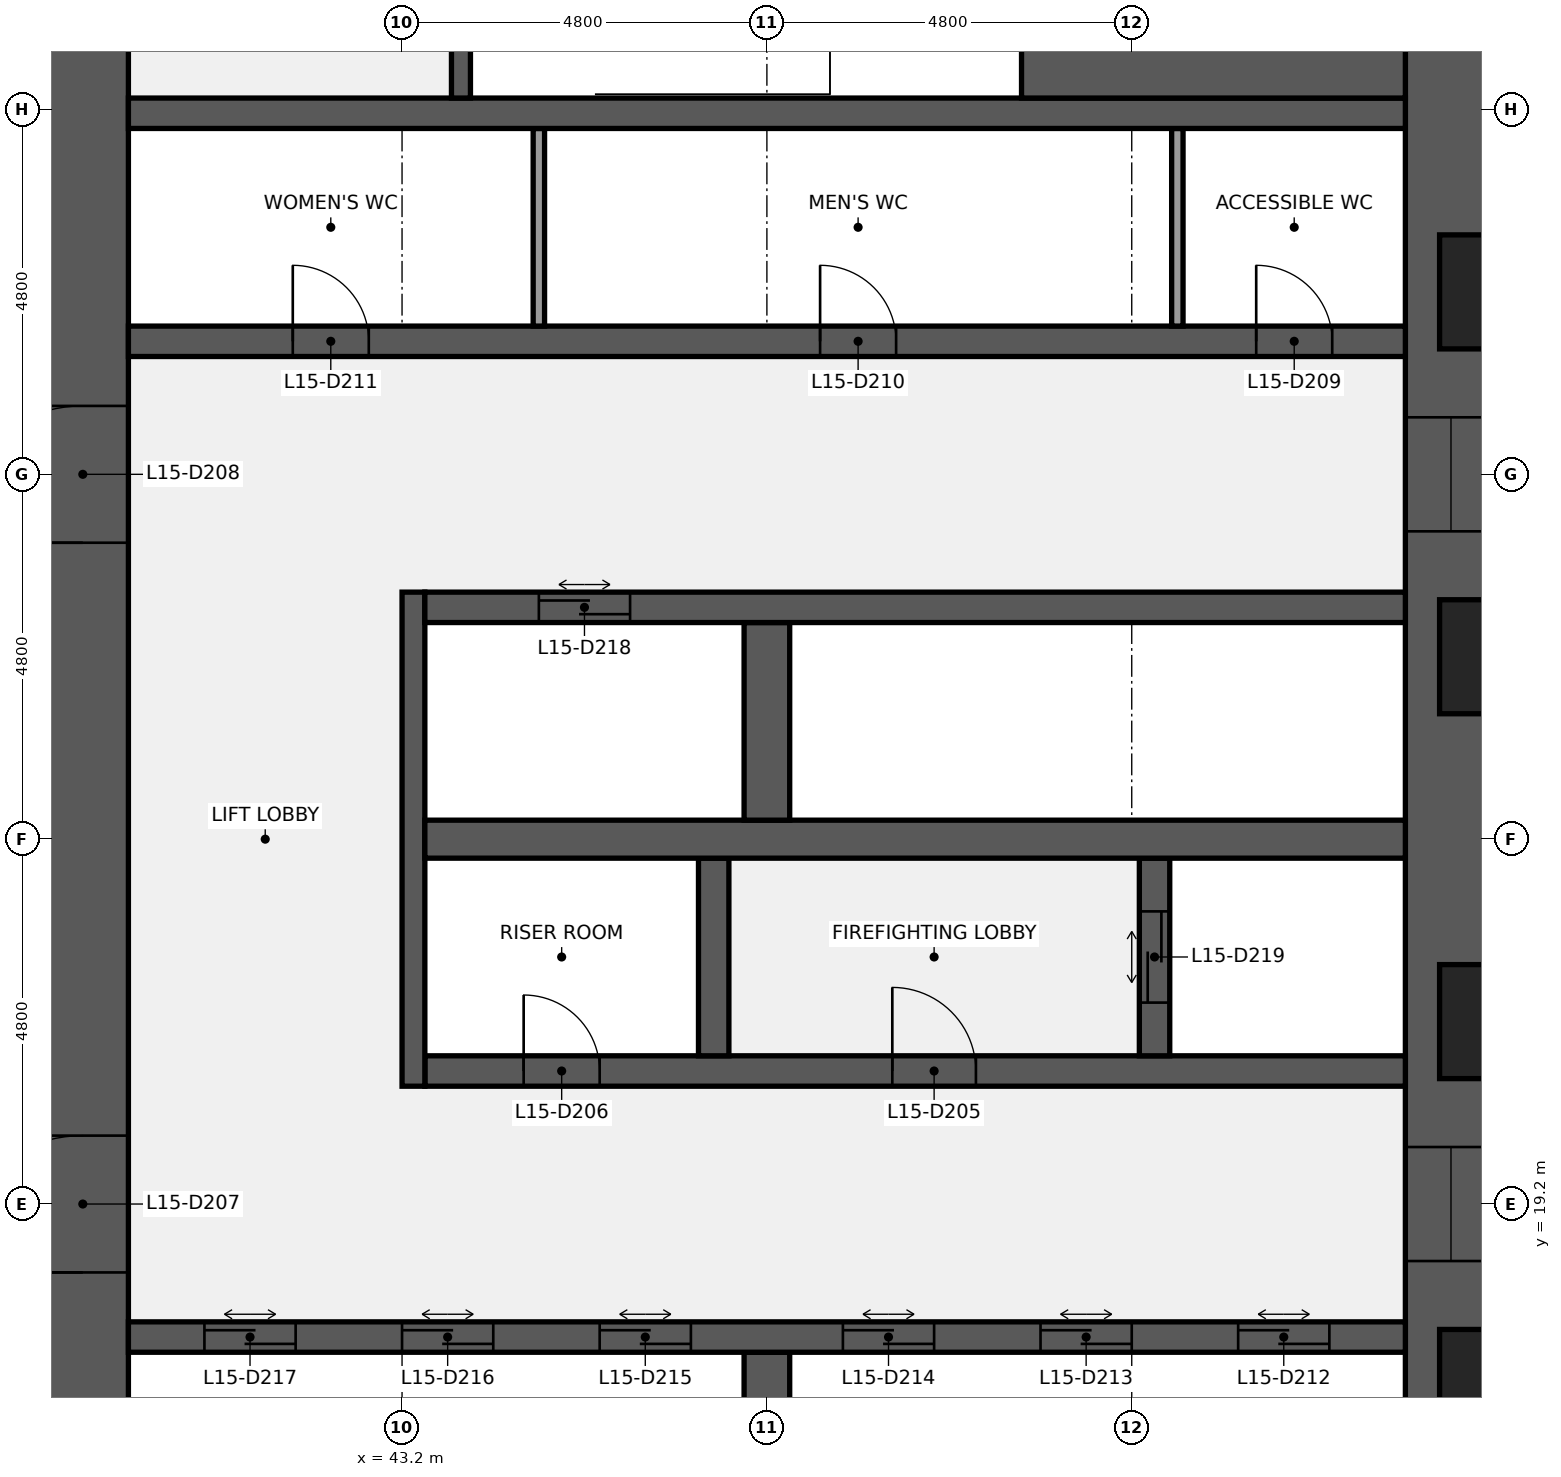
"""IFC4 building model, lengths in metres.
Left out: names, types, materials, properties, quantities, classifications, styles, units other than length and angle.
Written with IfcOpenShell. Run it as: python <this file> out.ifc"""

import sys

from ifc_helpers import new_model, si_unit, direction, frame, frame_2d, origin, place, context, subcontext, project, spatial, rectangle, extrude, element, fill, save


model = new_model("IFC4")
c1 = context("Model", 3, precision=1e-05, world=origin(), true_north=direction((0.0, 1.0)))
c2 = subcontext(c1, "Body", "Model", "MODEL_VIEW")
j1 = project(units=[si_unit("LENGTHUNIT", "METRE"), si_unit("PLANEANGLEUNIT", "RADIAN")], contexts=[c1])
p1 = place(None, origin())
s1 = spatial("IfcSite", under=j1, at=p1, CompositionType="ELEMENT")
p2 = place(p1, origin())
s2 = spatial("IfcBuilding", under=s1, at=p2, CompositionType="ELEMENT")
p3 = place(p2, frame((0.0, 0.0, 71.0)))
s3 = spatial("IfcBuildingStorey", under=s2, at=p3, CompositionType="ELEMENT", Elevation=71.0)
p4 = place(p3, frame((57.0, 38.4, 0.0), z_axis=(0.0, 0.0, 1.0), x_axis=(0.0, -1.0, 0.0)))
e1 = element("IfcWall", 1, at=p4, inside=s3, PredefinedType="SHEAR", context=c2, shape_type="SweptSolid", body=[
    extrude(rectangle(XDim=28.8, YDim=1.2, at=frame_2d((14.4, 0.0))), origin(), (0.0, 0.0, 1.0), 3.84),
])
p5 = place(p4, frame((18.45, 0.0, 0.9)))
e2 = element("IfcOpeningElement", 2, at=p5, cuts=e1, PredefinedType="OPENING", context=c2, shape_type="SweptSolid", body=[
    extrude(rectangle(XDim=1.5, YDim=1.5, at=frame_2d((0.75, 0.75))), frame((0.0, 0.61, 0.0), z_axis=(0.0, -1.0, 0.0), x_axis=(1.0, 0.0, 0.0)), (0.0, 0.0, 1.0), 1.22),
])
p6 = place(p4, frame((8.85, 0.0, 0.9)))
e3 = element("IfcOpeningElement", 3, at=p6, cuts=e1, PredefinedType="OPENING", context=c2, shape_type="SweptSolid", body=[
    extrude(rectangle(XDim=1.5, YDim=1.5, at=frame_2d((0.75, 0.75))), frame((0.0, 0.61, 0.0), z_axis=(0.0, -1.0, 0.0), x_axis=(1.0, 0.0, 0.0)), (0.0, 0.0, 1.0), 1.22),
])
p7 = place(p3, frame((39.0, 9.6, 0.0), z_axis=(0.0, 0.0, 1.0), x_axis=(0.0, 1.0, 0.0)))
e4 = element("IfcWall", 4, at=p7, inside=s3, PredefinedType="SHEAR", context=c2, shape_type="SweptSolid", body=[
    extrude(rectangle(XDim=28.8, YDim=1.2, at=frame_2d((14.4, 0.0))), origin(), (0.0, 0.0, 1.0), 3.84),
])
p8 = place(p7, frame((8.7, 0.0, 0.0)))
e5 = element("IfcOpeningElement", 5, at=p8, cuts=e4, PredefinedType="OPENING", context=c2, shape_type="SweptSolid", body=[
    extrude(rectangle(XDim=1.8, YDim=2.1, at=frame_2d((0.9, 1.05))), frame((0.0, 0.61, 0.0), z_axis=(0.0, -1.0, 0.0), x_axis=(1.0, 0.0, 0.0)), (0.0, 0.0, 1.0), 1.22),
])
p9 = place(p7, frame((18.3, 0.0, 0.0)))
e6 = element("IfcOpeningElement", 6, at=p9, cuts=e4, PredefinedType="OPENING", context=c2, shape_type="SweptSolid", body=[
    extrude(rectangle(XDim=1.8, YDim=2.1, at=frame_2d((0.9, 1.05))), frame((0.0, 0.61, 0.0), z_axis=(0.0, -1.0, 0.0), x_axis=(1.0, 0.0, 0.0)), (0.0, 0.0, 1.0), 1.22),
])
p10 = place(p3, frame((48.0, 14.65, 0.0), z_axis=(0.0, 0.0, 1.0), x_axis=(0.0, 1.0, 0.0)))
e7 = element("IfcWall", 7, at=p10, inside=s3, PredefinedType="SHEAR", context=c2, shape_type="SweptSolid", body=[
    extrude(rectangle(XDim=2.6, YDim=0.6, at=frame_2d((1.3, 0.0))), origin(), (0.0, 0.0, 1.0), 3.84),
])
p11 = place(p3, frame((39.6, 17.45, 0.0), z_axis=(0.0, 0.0, 1.0), x_axis=(1.0, 0.0, 0.0)))
e8 = element("IfcWall", 8, at=p11, inside=s3, PredefinedType="SHEAR", context=c2, shape_type="SweptSolid", body=[
    extrude(rectangle(XDim=16.8, YDim=0.4, at=frame_2d((8.4, 0.0))), origin(), (0.0, 0.0, 1.0), 3.84),
])
p12 = place(p11, frame((14.6, 0.0, 0.0)))
e9 = element("IfcOpeningElement", 9, at=p12, cuts=e8, PredefinedType="OPENING", context=c2, shape_type="SweptSolid", body=[
    extrude(rectangle(XDim=1.2, YDim=2.1, at=frame_2d((0.6, 1.05))), frame((0.0, 0.21, 0.0), z_axis=(0.0, -1.0, 0.0), x_axis=(1.0, 0.0, 0.0)), (0.0, 0.0, 1.0), 0.42),
])
p13 = place(p11, frame((12.0, 0.0, 0.0)))
e10 = element("IfcOpeningElement", 10, at=p13, cuts=e8, PredefinedType="OPENING", context=c2, shape_type="SweptSolid", body=[
    extrude(rectangle(XDim=1.2, YDim=2.1, at=frame_2d((0.6, 1.05))), frame((0.0, 0.21, 0.0), z_axis=(0.0, -1.0, 0.0), x_axis=(1.0, 0.0, 0.0)), (0.0, 0.0, 1.0), 0.42),
])
p14 = place(p11, frame((9.4, 0.0, 0.0)))
e11 = element("IfcOpeningElement", 11, at=p14, cuts=e8, PredefinedType="OPENING", context=c2, shape_type="SweptSolid", body=[
    extrude(rectangle(XDim=1.2, YDim=2.1, at=frame_2d((0.6, 1.05))), frame((0.0, 0.21, 0.0), z_axis=(0.0, -1.0, 0.0), x_axis=(1.0, 0.0, 0.0)), (0.0, 0.0, 1.0), 0.42),
])
p15 = place(p11, frame((6.2, 0.0, 0.0)))
e12 = element("IfcOpeningElement", 12, at=p15, cuts=e8, PredefinedType="OPENING", context=c2, shape_type="SweptSolid", body=[
    extrude(rectangle(XDim=1.2, YDim=2.1, at=frame_2d((0.6, 1.05))), frame((0.0, 0.21, 0.0), z_axis=(0.0, -1.0, 0.0), x_axis=(1.0, 0.0, 0.0)), (0.0, 0.0, 1.0), 0.42),
])
p16 = place(p11, frame((3.6, 0.0, 0.0)))
e13 = element("IfcOpeningElement", 13, at=p16, cuts=e8, PredefinedType="OPENING", context=c2, shape_type="SweptSolid", body=[
    extrude(rectangle(XDim=1.2, YDim=2.1, at=frame_2d((0.6, 1.05))), frame((0.0, 0.21, 0.0), z_axis=(0.0, -1.0, 0.0), x_axis=(1.0, 0.0, 0.0)), (0.0, 0.0, 1.0), 0.42),
])
p17 = place(p11, frame((1.0, 0.0, 0.0)))
e14 = element("IfcOpeningElement", 14, at=p17, cuts=e8, PredefinedType="OPENING", context=c2, shape_type="SweptSolid", body=[
    extrude(rectangle(XDim=1.2, YDim=2.1, at=frame_2d((0.6, 1.05))), frame((0.0, 0.21, 0.0), z_axis=(0.0, -1.0, 0.0), x_axis=(1.0, 0.0, 0.0)), (0.0, 0.0, 1.0), 0.42),
])
p18 = place(p3, frame((43.5, 20.95, 0.0), z_axis=(0.0, 0.0, 1.0), x_axis=(1.0, 0.0, 0.0)))
e15 = element("IfcWall", 15, at=p18, inside=s3, PredefinedType="SHEAR", context=c2, shape_type="SweptSolid", body=[
    extrude(rectangle(XDim=12.9, YDim=0.4, at=frame_2d((6.45, 0.0))), origin(), (0.0, 0.0, 1.0), 3.84),
])
p19 = place(p18, frame((6.15, 0.0, 0.0)))
e16 = element("IfcOpeningElement", 16, at=p19, cuts=e15, PredefinedType="OPENING", context=c2, shape_type="SweptSolid", body=[
    extrude(rectangle(XDim=1.1, YDim=2.1, at=frame_2d((0.55, 1.05))), frame((0.0, 0.21, 0.0), z_axis=(0.0, -1.0, 0.0), x_axis=(1.0, 0.0, 0.0)), (0.0, 0.0, 1.0), 0.42),
])
p20 = place(p18, frame((1.3, 0.0, 0.0)))
e17 = element("IfcOpeningElement", 17, at=p20, cuts=e15, PredefinedType="OPENING", context=c2, shape_type="SweptSolid", body=[
    extrude(rectangle(XDim=1.0, YDim=2.1, at=frame_2d((0.5, 1.05))), frame((0.0, 0.21, 0.0), z_axis=(0.0, -1.0, 0.0), x_axis=(1.0, 0.0, 0.0)), (0.0, 0.0, 1.0), 0.42),
])
p21 = place(p3, frame((43.35, 20.75, 0.0), z_axis=(0.0, 0.0, 1.0), x_axis=(0.0, 1.0, 0.0)))
e18 = element("IfcWall", 18, at=p21, inside=s3, PredefinedType="SHEAR", context=c2, shape_type="SweptSolid", body=[
    extrude(rectangle(XDim=6.5, YDim=0.3, at=frame_2d((3.25, 0.0))), origin(), (0.0, 0.0, 1.0), 3.84),
])
p22 = place(p3, frame((53.1, 21.15, 0.0), z_axis=(0.0, 0.0, 1.0), x_axis=(0.0, 1.0, 0.0)))
e19 = element("IfcWall", 19, at=p22, inside=s3, PredefinedType="SHEAR", context=c2, shape_type="SweptSolid", body=[
    extrude(rectangle(XDim=2.6, YDim=0.4, at=frame_2d((1.3, 0.0))), origin(), (0.0, 0.0, 1.0), 3.84),
])
p23 = place(p22, frame((0.7, 0.0, 0.0)))
e20 = element("IfcOpeningElement", 20, at=p23, cuts=e19, PredefinedType="OPENING", context=c2, shape_type="SweptSolid", body=[
    extrude(rectangle(XDim=1.2, YDim=2.1, at=frame_2d((0.6, 1.05))), frame((0.0, 0.21, 0.0), z_axis=(0.0, -1.0, 0.0), x_axis=(1.0, 0.0, 0.0)), (0.0, 0.0, 1.0), 0.42),
])
p24 = place(p3, frame((47.3, 21.15, 0.0), z_axis=(0.0, 0.0, 1.0), x_axis=(0.0, 1.0, 0.0)))
e21 = element("IfcWall", 21, at=p24, inside=s3, PredefinedType="SHEAR", context=c2, shape_type="SweptSolid", body=[
    extrude(rectangle(XDim=2.6, YDim=0.4, at=frame_2d((1.3, 0.0))), origin(), (0.0, 0.0, 1.0), 3.84),
])
p25 = place(p3, frame((43.5, 24.0, 0.0), z_axis=(0.0, 0.0, 1.0), x_axis=(1.0, 0.0, 0.0)))
e22 = element("IfcWall", 22, at=p25, inside=s3, PredefinedType="SHEAR", context=c2, shape_type="SweptSolid", body=[
    extrude(rectangle(XDim=12.9, YDim=0.5, at=frame_2d((6.45, 0.0))), origin(), (0.0, 0.0, 1.0), 3.84),
])
p26 = place(p3, frame((48.0, 24.25, 0.0), z_axis=(0.0, 0.0, 1.0), x_axis=(0.0, 1.0, 0.0)))
e23 = element("IfcWall", 23, at=p26, inside=s3, PredefinedType="SHEAR", context=c2, shape_type="SweptSolid", body=[
    extrude(rectangle(XDim=2.6, YDim=0.6, at=frame_2d((1.3, 0.0))), origin(), (0.0, 0.0, 1.0), 3.84),
])
p27 = place(p3, frame((43.5, 27.05, 0.0), z_axis=(0.0, 0.0, 1.0), x_axis=(1.0, 0.0, 0.0)))
e24 = element("IfcWall", 24, at=p27, inside=s3, PredefinedType="SHEAR", context=c2, shape_type="SweptSolid", body=[
    extrude(rectangle(XDim=12.9, YDim=0.4, at=frame_2d((6.45, 0.0))), origin(), (0.0, 0.0, 1.0), 3.84),
])
p28 = place(p27, frame((1.5, 0.0, 0.0)))
e25 = element("IfcOpeningElement", 25, at=p28, cuts=e24, PredefinedType="OPENING", context=c2, shape_type="SweptSolid", body=[
    extrude(rectangle(XDim=1.2, YDim=2.1, at=frame_2d((0.6, 1.05))), frame((0.0, 0.21, 0.0), z_axis=(0.0, -1.0, 0.0), x_axis=(1.0, 0.0, 0.0)), (0.0, 0.0, 1.0), 0.42),
])
p29 = place(p3, frame((39.6, 30.55, 0.0), z_axis=(0.0, 0.0, 1.0), x_axis=(1.0, 0.0, 0.0)))
e26 = element("IfcWall", 26, at=p29, inside=s3, PredefinedType="SHEAR", context=c2, shape_type="SweptSolid", body=[
    extrude(rectangle(XDim=16.8, YDim=0.4, at=frame_2d((8.4, 0.0))), origin(), (0.0, 0.0, 1.0), 3.84),
])
p30 = place(p29, frame((14.837, 0.0, 0.0)))
e27 = element("IfcOpeningElement", 27, at=p30, cuts=e26, PredefinedType="OPENING", context=c2, shape_type="SweptSolid", body=[
    extrude(rectangle(XDim=1.0, YDim=2.1, at=frame_2d((0.5, 1.05))), frame((0.0, 0.21, 0.0), z_axis=(0.0, -1.0, 0.0), x_axis=(1.0, 0.0, 0.0)), (0.0, 0.0, 1.0), 0.42),
])
p31 = place(p29, frame((9.1, 0.0, 0.0)))
e28 = element("IfcOpeningElement", 28, at=p31, cuts=e26, PredefinedType="OPENING", context=c2, shape_type="SweptSolid", body=[
    extrude(rectangle(XDim=1.0, YDim=2.1, at=frame_2d((0.5, 1.05))), frame((0.0, 0.21, 0.0), z_axis=(0.0, -1.0, 0.0), x_axis=(1.0, 0.0, 0.0)), (0.0, 0.0, 1.0), 0.42),
])
p32 = place(p29, frame((2.163, 0.0, 0.0)))
e29 = element("IfcOpeningElement", 29, at=p32, cuts=e26, PredefinedType="OPENING", context=c2, shape_type="SweptSolid", body=[
    extrude(rectangle(XDim=1.0, YDim=2.1, at=frame_2d((0.5, 1.05))), frame((0.0, 0.21, 0.0), z_axis=(0.0, -1.0, 0.0), x_axis=(1.0, 0.0, 0.0)), (0.0, 0.0, 1.0), 0.42),
])
for number, where, z_axis, x_axis in (
    (30, (53.4, 30.75, 0.0), (0.0, 0.0, 1.0), (0.0, 1.0, 0.0)),
    (31, (45.0, 30.75, 0.0), (0.0, 0.0, 1.0), (0.0, 1.0, 0.0)),
):
    element("IfcWall", number, at=place(p3, frame(where, z_axis=z_axis, x_axis=x_axis)), inside=s3, PredefinedType="PARTITIONING", context=c2, shape_type="SweptSolid", body=[
        extrude(rectangle(XDim=2.6, YDim=0.15, at=frame_2d((1.3, 0.0))), origin(), (0.0, 0.0, 1.0), 3.84),
    ])
p33 = place(p3, frame((39.6, 33.55, 0.0), z_axis=(0.0, 0.0, 1.0), x_axis=(1.0, 0.0, 0.0)))
e32 = element("IfcWall", 32, at=p33, inside=s3, PredefinedType="SHEAR", context=c2, shape_type="SweptSolid", body=[
    extrude(rectangle(XDim=16.8, YDim=0.4, at=frame_2d((8.4, 0.0))), origin(), (0.0, 0.0, 1.0), 3.84),
])
p34 = place(p3, frame((51.35, 35.475, 0.0), z_axis=(0.0, 0.0, 1.0), x_axis=(1.0, 0.0, 0.0)))
e33 = element("IfcWall", 33, at=p34, inside=s3, PredefinedType="SHEAR", context=c2, shape_type="SweptSolid", body=[
    extrude(rectangle(XDim=5.05, YDim=3.45, at=frame_2d((2.525, 0.0))), origin(), (0.0, 0.0, 1.0), 3.84),
])
p35 = place(p3, frame((43.975, 33.75, 0.0), z_axis=(0.0, 0.0, 1.0), x_axis=(0.0, 1.0, 0.0)))
e34 = element("IfcWall", 34, at=p35, inside=s3, PredefinedType="SHEAR", context=c2, shape_type="SweptSolid", body=[
    extrude(rectangle(XDim=3.45, YDim=0.25, at=frame_2d((1.725, 0.0))), origin(), (0.0, 0.0, 1.0), 3.84),
])
p36 = place(p35, frame((1.175, 0.0, 0.0)))
e35 = element("IfcOpeningElement", 35, at=p36, cuts=e34, PredefinedType="OPENING", context=c2, shape_type="SweptSolid", body=[
    extrude(rectangle(XDim=1.1, YDim=2.1, at=frame_2d((0.55, 1.05))), frame((0.0, 0.135, 0.0), z_axis=(0.0, -1.0, 0.0), x_axis=(1.0, 0.0, 0.0)), (0.0, 0.0, 1.0), 0.27),
])
p37 = place(p19, origin())
e36 = element("IfcDoor", 36, at=p37, inside=s3, OperationType="SINGLE_SWING_LEFT", PredefinedType="DOOR", context=c2, shape_type="SweptSolid", body=[
    extrude(rectangle(XDim=1.1, YDim=2.1, at=frame_2d((0.55, 1.05))), frame((0.0, 0.025, 0.0), z_axis=(0.0, -1.0, 0.0), x_axis=(1.0, 0.0, 0.0)), (0.0, 0.0, 1.0), 0.05),
])
fill(e16, e36)
p38 = place(p20, origin())
e37 = element("IfcDoor", 37, at=p38, inside=s3, OperationType="SINGLE_SWING_LEFT", PredefinedType="DOOR", context=c2, shape_type="SweptSolid", body=[
    extrude(rectangle(XDim=1.0, YDim=2.1, at=frame_2d((0.5, 1.05))), frame((0.0, 0.025, 0.0), z_axis=(0.0, -1.0, 0.0), x_axis=(1.0, 0.0, 0.0)), (0.0, 0.0, 1.0), 0.05),
])
fill(e17, e37)
p39 = place(p8, origin())
e38 = element("IfcDoor", 38, at=p39, inside=s3, OperationType="DOUBLE_DOOR_SINGLE_SWING", PredefinedType="DOOR", context=c2, shape_type="SweptSolid", body=[
    extrude(rectangle(XDim=1.8, YDim=2.1, at=frame_2d((0.9, 1.05))), frame((0.0, 0.025, 0.0), z_axis=(0.0, -1.0, 0.0), x_axis=(1.0, 0.0, 0.0)), (0.0, 0.0, 1.0), 0.05),
])
fill(e5, e38)
p40 = place(p9, origin())
e39 = element("IfcDoor", 39, at=p40, inside=s3, OperationType="DOUBLE_DOOR_SINGLE_SWING", PredefinedType="DOOR", context=c2, shape_type="SweptSolid", body=[
    extrude(rectangle(XDim=1.8, YDim=2.1, at=frame_2d((0.9, 1.05))), frame((0.0, 0.025, 0.0), z_axis=(0.0, -1.0, 0.0), x_axis=(1.0, 0.0, 0.0)), (0.0, 0.0, 1.0), 0.05),
])
fill(e6, e39)
p41 = place(p30, origin())
e40 = element("IfcDoor", 40, at=p41, inside=s3, OperationType="SINGLE_SWING_LEFT", PredefinedType="DOOR", context=c2, shape_type="SweptSolid", body=[
    extrude(rectangle(XDim=1.0, YDim=2.1, at=frame_2d((0.5, 1.05))), frame((0.0, 0.025, 0.0), z_axis=(0.0, -1.0, 0.0), x_axis=(1.0, 0.0, 0.0)), (0.0, 0.0, 1.0), 0.05),
])
fill(e27, e40)
p42 = place(p31, origin())
e41 = element("IfcDoor", 41, at=p42, inside=s3, OperationType="SINGLE_SWING_LEFT", PredefinedType="DOOR", context=c2, shape_type="SweptSolid", body=[
    extrude(rectangle(XDim=1.0, YDim=2.1, at=frame_2d((0.5, 1.05))), frame((0.0, 0.025, 0.0), z_axis=(0.0, -1.0, 0.0), x_axis=(1.0, 0.0, 0.0)), (0.0, 0.0, 1.0), 0.05),
])
fill(e28, e41)
p43 = place(p32, origin())
e42 = element("IfcDoor", 42, at=p43, inside=s3, OperationType="SINGLE_SWING_LEFT", PredefinedType="DOOR", context=c2, shape_type="SweptSolid", body=[
    extrude(rectangle(XDim=1.0, YDim=2.1, at=frame_2d((0.5, 1.05))), frame((0.0, 0.025, 0.0), z_axis=(0.0, -1.0, 0.0), x_axis=(1.0, 0.0, 0.0)), (0.0, 0.0, 1.0), 0.05),
])
fill(e29, e42)
p44 = place(p12, origin())
e43 = element("IfcDoor", 43, at=p44, inside=s3, OperationType="DOUBLE_DOOR_SLIDING", PredefinedType="DOOR", context=c2, shape_type="SweptSolid", body=[
    extrude(rectangle(XDim=1.2, YDim=2.1, at=frame_2d((0.6, 1.05))), frame((0.0, 0.025, 0.0), z_axis=(0.0, -1.0, 0.0), x_axis=(1.0, 0.0, 0.0)), (0.0, 0.0, 1.0), 0.05),
])
fill(e9, e43)
p45 = place(p13, origin())
e44 = element("IfcDoor", 44, at=p45, inside=s3, OperationType="DOUBLE_DOOR_SLIDING", PredefinedType="DOOR", context=c2, shape_type="SweptSolid", body=[
    extrude(rectangle(XDim=1.2, YDim=2.1, at=frame_2d((0.6, 1.05))), frame((0.0, 0.025, 0.0), z_axis=(0.0, -1.0, 0.0), x_axis=(1.0, 0.0, 0.0)), (0.0, 0.0, 1.0), 0.05),
])
fill(e10, e44)
p46 = place(p14, origin())
e45 = element("IfcDoor", 45, at=p46, inside=s3, OperationType="DOUBLE_DOOR_SLIDING", PredefinedType="DOOR", context=c2, shape_type="SweptSolid", body=[
    extrude(rectangle(XDim=1.2, YDim=2.1, at=frame_2d((0.6, 1.05))), frame((0.0, 0.025, 0.0), z_axis=(0.0, -1.0, 0.0), x_axis=(1.0, 0.0, 0.0)), (0.0, 0.0, 1.0), 0.05),
])
fill(e11, e45)
p47 = place(p15, origin())
e46 = element("IfcDoor", 46, at=p47, inside=s3, OperationType="DOUBLE_DOOR_SLIDING", PredefinedType="DOOR", context=c2, shape_type="SweptSolid", body=[
    extrude(rectangle(XDim=1.2, YDim=2.1, at=frame_2d((0.6, 1.05))), frame((0.0, 0.025, 0.0), z_axis=(0.0, -1.0, 0.0), x_axis=(1.0, 0.0, 0.0)), (0.0, 0.0, 1.0), 0.05),
])
fill(e12, e46)
p48 = place(p16, origin())
e47 = element("IfcDoor", 47, at=p48, inside=s3, OperationType="DOUBLE_DOOR_SLIDING", PredefinedType="DOOR", context=c2, shape_type="SweptSolid", body=[
    extrude(rectangle(XDim=1.2, YDim=2.1, at=frame_2d((0.6, 1.05))), frame((0.0, 0.025, 0.0), z_axis=(0.0, -1.0, 0.0), x_axis=(1.0, 0.0, 0.0)), (0.0, 0.0, 1.0), 0.05),
])
fill(e13, e47)
p49 = place(p17, origin())
e48 = element("IfcDoor", 48, at=p49, inside=s3, OperationType="DOUBLE_DOOR_SLIDING", PredefinedType="DOOR", context=c2, shape_type="SweptSolid", body=[
    extrude(rectangle(XDim=1.2, YDim=2.1, at=frame_2d((0.6, 1.05))), frame((0.0, 0.025, 0.0), z_axis=(0.0, -1.0, 0.0), x_axis=(1.0, 0.0, 0.0)), (0.0, 0.0, 1.0), 0.05),
])
fill(e14, e48)
p50 = place(p28, origin())
e49 = element("IfcDoor", 49, at=p50, inside=s3, OperationType="DOUBLE_DOOR_SLIDING", PredefinedType="DOOR", context=c2, shape_type="SweptSolid", body=[
    extrude(rectangle(XDim=1.2, YDim=2.1, at=frame_2d((0.6, 1.05))), frame((0.0, 0.025, 0.0), z_axis=(0.0, -1.0, 0.0), x_axis=(1.0, 0.0, 0.0)), (0.0, 0.0, 1.0), 0.05),
])
fill(e25, e49)
p51 = place(p23, origin())
e50 = element("IfcDoor", 50, at=p51, inside=s3, OperationType="DOUBLE_DOOR_SLIDING", PredefinedType="DOOR", context=c2, shape_type="SweptSolid", body=[
    extrude(rectangle(XDim=1.2, YDim=2.1, at=frame_2d((0.6, 1.05))), frame((0.0, 0.025, 0.0), z_axis=(0.0, -1.0, 0.0), x_axis=(1.0, 0.0, 0.0)), (0.0, 0.0, 1.0), 0.05),
])
fill(e20, e50)
p52 = place(p5, origin())
e51 = element("IfcWindow", 51, at=p52, inside=s3, PartitioningType="SINGLE_PANEL", PredefinedType="WINDOW", context=c2, shape_type="SweptSolid", body=[
    extrude(rectangle(XDim=1.5, YDim=1.5, at=frame_2d((0.75, 0.75))), frame((0.0, 0.03, 0.0), z_axis=(0.0, -1.0, 0.0), x_axis=(1.0, 0.0, 0.0)), (0.0, 0.0, 1.0), 0.06),
])
fill(e2, e51)
p53 = place(p6, origin())
e52 = element("IfcWindow", 52, at=p53, inside=s3, PartitioningType="SINGLE_PANEL", PredefinedType="WINDOW", context=c2, shape_type="SweptSolid", body=[
    extrude(rectangle(XDim=1.5, YDim=1.5, at=frame_2d((0.75, 0.75))), frame((0.0, 0.03, 0.0), z_axis=(0.0, -1.0, 0.0), x_axis=(1.0, 0.0, 0.0)), (0.0, 0.0, 1.0), 0.06),
])
fill(e3, e52)
save(model, sys.argv[1])
